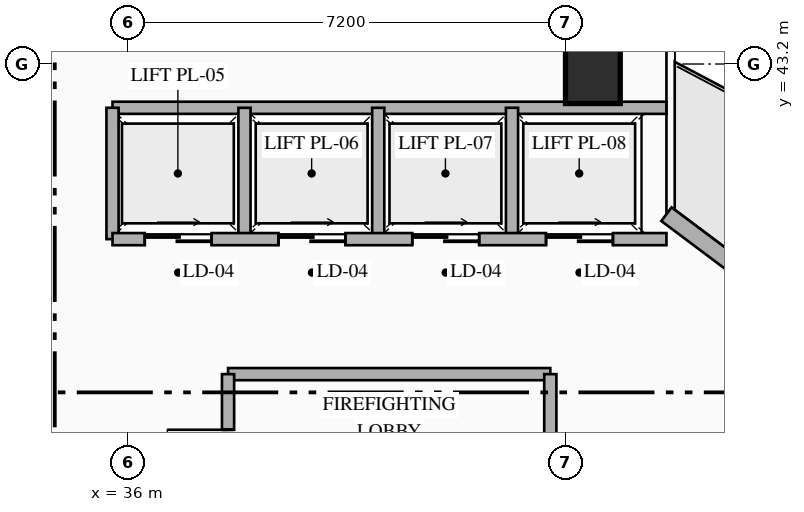
"""IFC4 building model, lengths in metres.
Left out: names, types, materials, properties, quantities, classifications, styles, units other than length and angle.
Written with IfcOpenShell. Run it as: python <this file> out.ifc"""

import sys

from ifc_helpers import new_model, si_unit, direction, frame, frame_2d, origin, origin_2d, place, context, subcontext, project, spatial, rectangle, extrude, element, fill, save


model = new_model("IFC4")
c1 = context("Model", 3, precision=1e-05, world=origin(), true_north=direction((0.0, 1.0)))
c2 = subcontext(c1, "Body", "Model", "MODEL_VIEW")
j1 = project(units=[si_unit("LENGTHUNIT", "METRE"), si_unit("PLANEANGLEUNIT", "RADIAN")], contexts=[c1])
p1 = place(None, origin())
s1 = spatial("IfcSite", under=j1, at=p1, CompositionType="ELEMENT")
p2 = place(p1, origin())
s2 = spatial("IfcBuilding", under=s1, at=p2, CompositionType="ELEMENT")
p3 = place(p2, frame((0.0, 0.0, 134.85)))
s3 = spatial("IfcBuildingStorey", under=s2, at=p3, CompositionType="ELEMENT", Elevation=134.85)
p4 = place(p3, frame((43.65, 43.0, 0.0), z_axis=(0.0, 0.0, 1.0), x_axis=(1.0, 0.0, 0.0)))
e1 = element("IfcColumn", 1, at=p4, inside=s3, PredefinedType="COLUMN", context=c2, shape_type="SweptSolid", body=[
    extrude(rectangle(XDim=0.9, YDim=0.9, at=origin_2d()), origin(), (0.0, 0.0, 1.0), 3.6),
])
p5 = place(p3, frame((44.86, 40.73, 0.0), z_axis=(0.0, 0.0, 1.0), x_axis=(0.800007624502, -0.599989833863, 0.0)))
e2 = element("IfcWall", 2, at=p5, inside=s3, PredefinedType="STANDARD", context=c2, shape_type="SweptSolid", body=[
    extrude(rectangle(XDim=19.212, YDim=0.28, at=frame_2d((9.606, 0.0))), origin(), (0.0, 0.0, 1.0), 3.35),
])
p6 = place(p5, frame((1.755, 0.0, 0.0)))
e3 = element("IfcOpeningElement", 3, at=p6, cuts=e2, PredefinedType="OPENING", context=c2, shape_type="SweptSolid", body=[
    extrude(rectangle(XDim=1.1, YDim=2.2, at=frame_2d((0.55, 1.1))), frame((0.0, 0.15, 0.0), z_axis=(0.0, -1.0, 0.0), x_axis=(1.0, 0.0, 0.0)), (0.0, 0.0, 1.0), 0.3),
])
p7 = place(p5, frame((13.509, 0.0, 0.85)))
e4 = element("IfcOpeningElement", 4, at=p7, cuts=e2, PredefinedType="OPENING", context=c2, shape_type="SweptSolid", body=[
    extrude(rectangle(XDim=1.8, YDim=2.1, at=frame_2d((0.9, 1.05))), frame((0.0, 0.15, 0.0), z_axis=(0.0, -1.0, 0.0), x_axis=(1.0, 0.0, 0.0)), (0.0, 0.0, 1.0), 0.3),
])
p8 = place(p3, frame((37.65, 38.1, 0.0), z_axis=(0.0, 0.0, 1.0), x_axis=(1.0, 0.0, 0.0)))
e5 = element("IfcWall", 5, at=p8, inside=s3, PredefinedType="STANDARD", context=c2, shape_type="SweptSolid", body=[
    extrude(rectangle(XDim=5.3, YDim=0.2, at=frame_2d((2.65, 0.0))), origin(), (0.0, 0.0, 1.0), 3.35),
])
p9 = place(p3, frame((42.95, 35.27, 0.0), z_axis=(0.0, 0.0, 1.0), x_axis=(0.0, 1.0, 0.0)))
e6 = element("IfcWall", 6, at=p9, inside=s3, PredefinedType="STANDARD", context=c2, shape_type="SweptSolid", body=[
    extrude(rectangle(XDim=2.83, YDim=0.2, at=frame_2d((1.415, 0.0))), origin(), (0.0, 0.0, 1.0), 3.35),
])
p10 = place(p3, frame((37.65, 35.27, 0.0), z_axis=(0.0, 0.0, 1.0), x_axis=(0.0, 1.0, 0.0)))
e7 = element("IfcWall", 7, at=p10, inside=s3, PredefinedType="STANDARD", context=c2, shape_type="SweptSolid", body=[
    extrude(rectangle(XDim=2.83, YDim=0.2, at=frame_2d((1.415, 0.0))), origin(), (0.0, 0.0, 1.0), 3.35),
])
p11 = place(p10, frame((0.915, 0.0, 0.0)))
e8 = element("IfcOpeningElement", 8, at=p11, cuts=e7, PredefinedType="OPENING", context=c2, shape_type="SweptSolid", body=[
    extrude(rectangle(XDim=1.0, YDim=2.2, at=frame_2d((0.5, 1.1))), frame((0.0, 0.11, 0.0), z_axis=(0.0, -1.0, 0.0), x_axis=(1.0, 0.0, 0.0)), (0.0, 0.0, 1.0), 0.22),
])
p12 = place(p3, frame((35.75, 42.48, 0.0), z_axis=(0.0, 0.0, 1.0), x_axis=(1.0, 0.0, 0.0)))
e9 = element("IfcWall", 9, at=p12, inside=s3, PredefinedType="STANDARD", context=c2, shape_type="SweptSolid", body=[
    extrude(rectangle(XDim=9.11, YDim=0.2, at=frame_2d((4.555, 0.0))), origin(), (0.0, 0.0, 1.0), 3.35),
])
for number, where, z_axis, x_axis in (
    (10, (35.75, 40.32, 0.0), (0.0, 0.0, 1.0), (0.0, 1.0, 0.0)),
    (11, (37.92, 40.32, 0.0), (0.0, 0.0, 1.0), (0.0, 1.0, 0.0)),
    (12, (40.12, 40.32, 0.0), (0.0, 0.0, 1.0), (0.0, 1.0, 0.0)),
    (13, (42.32, 40.32, 0.0), (0.0, 0.0, 1.0), (0.0, 1.0, 0.0)),
):
    element("IfcWall", number, at=place(p3, frame(where, z_axis=z_axis, x_axis=x_axis)), inside=s3, PredefinedType="STANDARD", context=c2, shape_type="SweptSolid", body=[
        extrude(rectangle(XDim=2.16, YDim=0.2, at=frame_2d((1.08, 0.0))), origin(), (0.0, 0.0, 1.0), 3.35),
    ])
p13 = place(p3, frame((35.75, 40.32, 0.0), z_axis=(0.0, 0.0, 1.0), x_axis=(1.0, 0.0, 0.0)))
e14 = element("IfcWall", 14, at=p13, inside=s3, PredefinedType="STANDARD", context=c2, shape_type="SweptSolid", body=[
    extrude(rectangle(XDim=9.11, YDim=0.2, at=frame_2d((4.555, 0.0))), origin(), (0.0, 0.0, 1.0), 3.35),
])
p14 = place(p13, frame((0.53, 0.0, 0.0)))
e15 = element("IfcOpeningElement", 15, at=p14, cuts=e14, PredefinedType="OPENING", context=c2, shape_type="SweptSolid", body=[
    extrude(rectangle(XDim=1.1, YDim=2.18, at=frame_2d((0.55, 1.09))), frame((0.0, 0.11, 0.0), z_axis=(0.0, -1.0, 0.0), x_axis=(1.0, 0.0, 0.0)), (0.0, 0.0, 1.0), 0.22),
])
p15 = place(p13, frame((2.73, 0.0, 0.0)))
e16 = element("IfcOpeningElement", 16, at=p15, cuts=e14, PredefinedType="OPENING", context=c2, shape_type="SweptSolid", body=[
    extrude(rectangle(XDim=1.1, YDim=2.18, at=frame_2d((0.55, 1.09))), frame((0.0, 0.11, 0.0), z_axis=(0.0, -1.0, 0.0), x_axis=(1.0, 0.0, 0.0)), (0.0, 0.0, 1.0), 0.22),
])
p16 = place(p13, frame((4.93, 0.0, 0.0)))
e17 = element("IfcOpeningElement", 17, at=p16, cuts=e14, PredefinedType="OPENING", context=c2, shape_type="SweptSolid", body=[
    extrude(rectangle(XDim=1.1, YDim=2.18, at=frame_2d((0.55, 1.09))), frame((0.0, 0.11, 0.0), z_axis=(0.0, -1.0, 0.0), x_axis=(1.0, 0.0, 0.0)), (0.0, 0.0, 1.0), 0.22),
])
p17 = place(p13, frame((7.13, 0.0, 0.0)))
e18 = element("IfcOpeningElement", 18, at=p17, cuts=e14, PredefinedType="OPENING", context=c2, shape_type="SweptSolid", body=[
    extrude(rectangle(XDim=1.1, YDim=2.18, at=frame_2d((0.55, 1.09))), frame((0.0, 0.11, 0.0), z_axis=(0.0, -1.0, 0.0), x_axis=(1.0, 0.0, 0.0)), (0.0, 0.0, 1.0), 0.22),
])
p18 = place(p3, frame((43.63, 31.973, 0.0), z_axis=(0.0, 0.0, 1.0), x_axis=(0.599975099311, 0.800018674911, 0.0)))
e19 = element("IfcWall", 19, at=p18, inside=s3, PredefinedType="PARTITIONING", context=c2, shape_type="SweptSolid", body=[
    extrude(rectangle(XDim=7.844, YDim=0.15, at=frame_2d((3.922, 0.0))), origin(), (0.0, 0.0, 1.0), 3.35),
])
p19 = place(p11, origin())
e20 = element("IfcDoor", 20, at=p19, inside=s3, OperationType="SINGLE_SWING_RIGHT", PredefinedType="DOOR", context=c2, shape_type="SweptSolid", body=[
    extrude(rectangle(XDim=1.0, YDim=2.2, at=frame_2d((0.5, 1.1))), frame((0.0, 0.025, 0.0), z_axis=(0.0, -1.0, 0.0), x_axis=(1.0, 0.0, 0.0)), (0.0, 0.0, 1.0), 0.05),
])
fill(e8, e20)
p20 = place(p14, origin())
e21 = element("IfcDoor", 21, at=p20, inside=s3, OperationType="SLIDING_TO_RIGHT", PredefinedType="USERDEFINED", context=c2, shape_type="SweptSolid", body=[
    extrude(rectangle(XDim=1.1, YDim=2.18, at=frame_2d((0.55, 1.09))), frame((0.0, 0.025, 0.0), z_axis=(0.0, -1.0, 0.0), x_axis=(1.0, 0.0, 0.0)), (0.0, 0.0, 1.0), 0.05),
])
fill(e15, e21)
p21 = place(p15, origin())
e22 = element("IfcDoor", 22, at=p21, inside=s3, OperationType="SLIDING_TO_RIGHT", PredefinedType="USERDEFINED", context=c2, shape_type="SweptSolid", body=[
    extrude(rectangle(XDim=1.1, YDim=2.18, at=frame_2d((0.55, 1.09))), frame((0.0, 0.025, 0.0), z_axis=(0.0, -1.0, 0.0), x_axis=(1.0, 0.0, 0.0)), (0.0, 0.0, 1.0), 0.05),
])
fill(e16, e22)
p22 = place(p16, origin())
e23 = element("IfcDoor", 23, at=p22, inside=s3, OperationType="SLIDING_TO_RIGHT", PredefinedType="USERDEFINED", context=c2, shape_type="SweptSolid", body=[
    extrude(rectangle(XDim=1.1, YDim=2.18, at=frame_2d((0.55, 1.09))), frame((0.0, 0.025, 0.0), z_axis=(0.0, -1.0, 0.0), x_axis=(1.0, 0.0, 0.0)), (0.0, 0.0, 1.0), 0.05),
])
fill(e17, e23)
p23 = place(p17, origin())
e24 = element("IfcDoor", 24, at=p23, inside=s3, OperationType="SLIDING_TO_RIGHT", PredefinedType="USERDEFINED", context=c2, shape_type="SweptSolid", body=[
    extrude(rectangle(XDim=1.1, YDim=2.18, at=frame_2d((0.55, 1.09))), frame((0.0, 0.025, 0.0), z_axis=(0.0, -1.0, 0.0), x_axis=(1.0, 0.0, 0.0)), (0.0, 0.0, 1.0), 0.05),
])
fill(e18, e24)
save(model, sys.argv[1])
